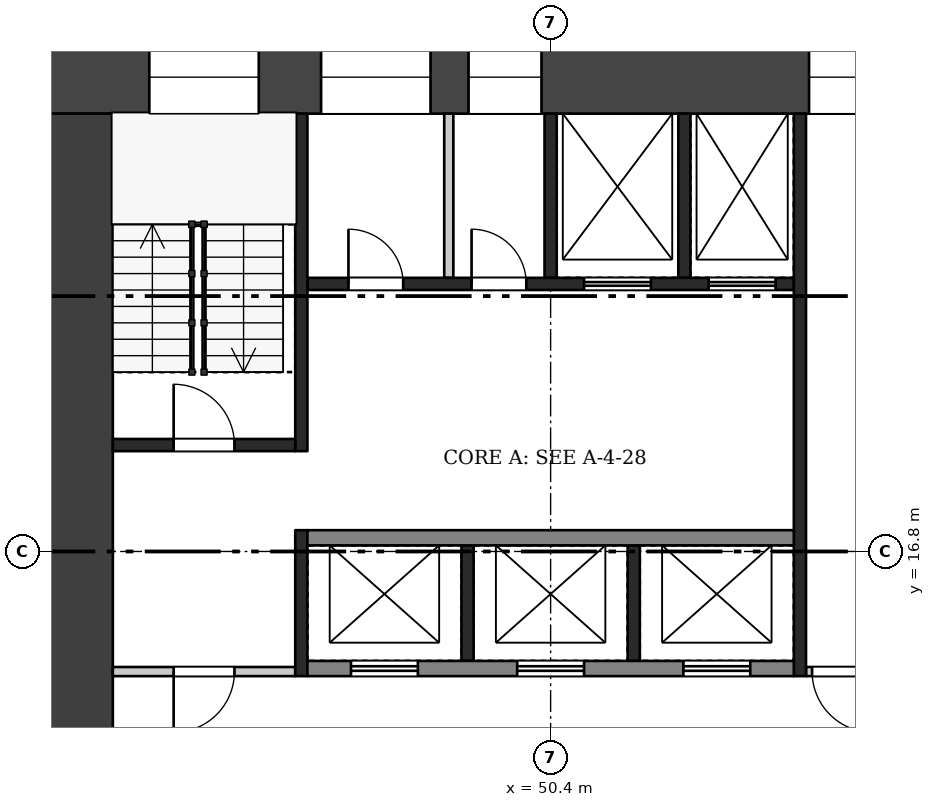
"""IFC4 building model, lengths in metres.
Left out: names, types, materials, properties, quantities, classifications, styles, units other than length and angle.
Written with IfcOpenShell. Run it as: python <this file> out.ifc"""

import sys

from ifc_helpers import new_model, si_unit, direction, frame, frame_2d, origin, place, context, subcontext, project, spatial, rectangle, extrude, element, fill, save


model = new_model("IFC4")
c1 = context("Model", 3, precision=1e-05, world=origin(), true_north=direction((0.0, 1.0)))
c2 = subcontext(c1, "Body", "Model", "MODEL_VIEW")
j1 = project(units=[si_unit("LENGTHUNIT", "METRE"), si_unit("PLANEANGLEUNIT", "RADIAN")], contexts=[c1])
p1 = place(None, origin())
s1 = spatial("IfcSite", under=j1, at=p1, CompositionType="ELEMENT")
p2 = place(p1, origin())
s2 = spatial("IfcBuilding", under=s1, at=p2, CompositionType="ELEMENT")
p3 = place(p2, frame((0.0, 0.0, 200.2)))
s3 = spatial("IfcBuildingStorey", under=s2, at=p3, CompositionType="ELEMENT", Elevation=200.2)
p4 = place(p3, frame((42.0, 24.6, 0.0), z_axis=(0.0, 0.0, 1.0), x_axis=(1.0, 0.0, 0.0)))
e1 = element("IfcWall", 1, at=p4, inside=s3, PredefinedType="SHEAR", context=c2, shape_type="SweptSolid", body=[
    extrude(rectangle(XDim=16.8, YDim=1.2, at=frame_2d((8.4, 0.0))), origin(), (0.0, 0.0, 1.0), 3.22),
])
p5 = place(p4, frame((1.8, 0.0, 0.5)))
e2 = element("IfcOpeningElement", 2, at=p5, cuts=e1, PredefinedType="OPENING", context=c2, shape_type="SweptSolid", body=[
    extrude(rectangle(XDim=1.8, YDim=2.4, at=frame_2d((0.9, 1.2))), frame((0.0, 0.61, 0.0), z_axis=(0.0, -1.0, 0.0), x_axis=(1.0, 0.0, 0.0)), (0.0, 0.0, 1.0), 1.22),
])
p6 = place(p4, frame((4.625, 0.0, 1.6)))
e3 = element("IfcOpeningElement", 3, at=p6, cuts=e1, PredefinedType="OPENING", context=c2, shape_type="SweptSolid", body=[
    extrude(rectangle(XDim=1.8, YDim=1.2, at=frame_2d((0.9, 0.6))), frame((0.0, 0.61, 0.0), z_axis=(0.0, -1.0, 0.0), x_axis=(1.0, 0.0, 0.0)), (0.0, 0.0, 1.0), 1.22),
])
p7 = place(p4, frame((7.05, 0.0, 1.6)))
e4 = element("IfcOpeningElement", 4, at=p7, cuts=e1, PredefinedType="OPENING", context=c2, shape_type="SweptSolid", body=[
    extrude(rectangle(XDim=1.2, YDim=1.2, at=frame_2d((0.6, 0.6))), frame((0.0, 0.61, 0.0), z_axis=(0.0, -1.0, 0.0), x_axis=(1.0, 0.0, 0.0)), (0.0, 0.0, 1.0), 1.22),
])
p8 = place(p4, frame((12.65, 0.0, 0.6)))
e5 = element("IfcOpeningElement", 5, at=p8, cuts=e1, PredefinedType="OPENING", context=c2, shape_type="SweptSolid", body=[
    extrude(rectangle(XDim=1.0, YDim=2.1, at=frame_2d((0.5, 1.05))), frame((0.0, 0.61, 0.0), z_axis=(0.0, -1.0, 0.0), x_axis=(1.0, 0.0, 0.0)), (0.0, 0.0, 1.0), 1.22),
])
p9 = place(p4, frame((14.175, 0.0, 1.6)))
e6 = element("IfcOpeningElement", 6, at=p9, cuts=e1, PredefinedType="OPENING", context=c2, shape_type="SweptSolid", body=[
    extrude(rectangle(XDim=1.2, YDim=1.2, at=frame_2d((0.6, 0.6))), frame((0.0, 0.61, 0.0), z_axis=(0.0, -1.0, 0.0), x_axis=(1.0, 0.0, 0.0)), (0.0, 0.0, 1.0), 1.22),
])
p10 = place(p3, frame((42.6, 9.6, 0.0), z_axis=(0.0, 0.0, 1.0), x_axis=(0.0, 1.0, 0.0)))
e7 = element("IfcWall", 7, at=p10, inside=s3, PredefinedType="SHEAR", context=c2, shape_type="SweptSolid", body=[
    extrude(rectangle(XDim=14.4, YDim=1.2, at=frame_2d((7.2, 0.0))), origin(), (0.0, 0.0, 1.0), 3.22),
])
p11 = place(p10, frame((2.1, 0.0, 0.0)))
e8 = element("IfcOpeningElement", 8, at=p11, cuts=e7, PredefinedType="OPENING", context=c2, shape_type="SweptSolid", body=[
    extrude(rectangle(XDim=1.8, YDim=2.1, at=frame_2d((0.9, 1.05))), frame((0.0, 0.61, 0.0), z_axis=(0.0, -1.0, 0.0), x_axis=(1.0, 0.0, 0.0)), (0.0, 0.0, 1.0), 1.22),
])
for number, where, z_axis, x_axis in (
    (9, (49.033, 15.0, 0.0), (0.0, 0.0, 1.0), (0.0, 1.0, 0.0)),
    (10, (51.767, 15.0, 0.0), (0.0, 0.0, 1.0), (0.0, 1.0, 0.0)),
):
    element("IfcWall", number, at=place(p3, frame(where, z_axis=z_axis, x_axis=x_axis)), inside=s3, PredefinedType="SHEAR", context=c2, shape_type="SweptSolid", body=[
        extrude(rectangle(XDim=1.9, YDim=0.2, at=frame_2d((0.95, 0.0))), origin(), (0.0, 0.0, 1.0), 3.22),
    ])
p12 = place(p3, frame((46.4, 14.875, 0.0), z_axis=(0.0, 0.0, 1.0), x_axis=(1.0, 0.0, 0.0)))
e11 = element("IfcWall", 11, at=p12, inside=s3, PredefinedType="SHEAR", context=c2, shape_type="SweptSolid", body=[
    extrude(rectangle(XDim=8.0, YDim=0.25, at=frame_2d((4.0, 0.0))), origin(), (0.0, 0.0, 1.0), 3.22),
])
p13 = place(p12, frame((0.717, 0.0, 0.0)))
e12 = element("IfcOpeningElement", 12, at=p13, cuts=e11, PredefinedType="OPENING", context=c2, shape_type="SweptSolid", body=[
    extrude(rectangle(XDim=1.1, YDim=2.1, at=frame_2d((0.55, 1.05))), frame((0.0, 0.135, 0.0), z_axis=(0.0, -1.0, 0.0), x_axis=(1.0, 0.0, 0.0)), (0.0, 0.0, 1.0), 0.27),
])
p14 = place(p12, frame((3.45, 0.0, 0.0)))
e13 = element("IfcOpeningElement", 13, at=p14, cuts=e11, PredefinedType="OPENING", context=c2, shape_type="SweptSolid", body=[
    extrude(rectangle(XDim=1.1, YDim=2.1, at=frame_2d((0.55, 1.05))), frame((0.0, 0.135, 0.0), z_axis=(0.0, -1.0, 0.0), x_axis=(1.0, 0.0, 0.0)), (0.0, 0.0, 1.0), 0.27),
])
p15 = place(p12, frame((6.183, 0.0, 0.0)))
e14 = element("IfcOpeningElement", 14, at=p15, cuts=e11, PredefinedType="OPENING", context=c2, shape_type="SweptSolid", body=[
    extrude(rectangle(XDim=1.1, YDim=2.1, at=frame_2d((0.55, 1.05))), frame((0.0, 0.135, 0.0), z_axis=(0.0, -1.0, 0.0), x_axis=(1.0, 0.0, 0.0)), (0.0, 0.0, 1.0), 0.27),
])
p16 = place(p3, frame((46.4, 17.025, 0.0), z_axis=(0.0, 0.0, 1.0), x_axis=(1.0, 0.0, 0.0)))
e15 = element("IfcWall", 15, at=p16, inside=s3, PredefinedType="SHEAR", context=c2, shape_type="SweptSolid", body=[
    extrude(rectangle(XDim=8.0, YDim=0.25, at=frame_2d((4.0, 0.0))), origin(), (0.0, 0.0, 1.0), 3.22),
])
for number, where, z_axis, x_axis in (
    (16, (50.4, 21.3, 0.0), (0.0, 0.0, 1.0), (0.0, 1.0, 0.0)),
    (17, (52.6, 21.3, 0.0), (0.0, 0.0, 1.0), (0.0, 1.0, 0.0)),
):
    element("IfcWall", number, at=place(p3, frame(where, z_axis=z_axis, x_axis=x_axis)), inside=s3, PredefinedType="SHEAR", context=c2, shape_type="SweptSolid", body=[
        extrude(rectangle(XDim=2.7, YDim=0.2, at=frame_2d((1.35, 0.0))), origin(), (0.0, 0.0, 1.0), 3.22),
    ])
p17 = place(p3, frame((48.725, 21.3, 0.0), z_axis=(0.0, 0.0, 1.0), x_axis=(0.0, 1.0, 0.0)))
e18 = element("IfcWall", 18, at=p17, inside=s3, PredefinedType="PARTITIONING", context=c2, shape_type="SweptSolid", body=[
    extrude(rectangle(XDim=2.7, YDim=0.15, at=frame_2d((1.35, 0.0))), origin(), (0.0, 0.0, 1.0), 3.22),
])
p18 = place(p3, frame((46.4, 21.2, 0.0), z_axis=(0.0, 0.0, 1.0), x_axis=(1.0, 0.0, 0.0)))
e19 = element("IfcWall", 19, at=p18, inside=s3, PredefinedType="SHEAR", context=c2, shape_type="SweptSolid", body=[
    extrude(rectangle(XDim=8.0, YDim=0.2, at=frame_2d((4.0, 0.0))), origin(), (0.0, 0.0, 1.0), 3.22),
])
p19 = place(p18, frame((0.675, 0.0, 0.0)))
e20 = element("IfcOpeningElement", 20, at=p19, cuts=e19, PredefinedType="OPENING", context=c2, shape_type="SweptSolid", body=[
    extrude(rectangle(XDim=0.9, YDim=2.1, at=frame_2d((0.45, 1.05))), frame((0.0, 0.11, 0.0), z_axis=(0.0, -1.0, 0.0), x_axis=(1.0, 0.0, 0.0)), (0.0, 0.0, 1.0), 0.22),
])
p20 = place(p18, frame((2.7, 0.0, 0.0)))
e21 = element("IfcOpeningElement", 21, at=p20, cuts=e19, PredefinedType="OPENING", context=c2, shape_type="SweptSolid", body=[
    extrude(rectangle(XDim=0.9, YDim=2.1, at=frame_2d((0.45, 1.05))), frame((0.0, 0.11, 0.0), z_axis=(0.0, -1.0, 0.0), x_axis=(1.0, 0.0, 0.0)), (0.0, 0.0, 1.0), 0.22),
])
p21 = place(p18, frame((4.55, 0.0, 0.0)))
e22 = element("IfcOpeningElement", 22, at=p21, cuts=e19, PredefinedType="OPENING", context=c2, shape_type="SweptSolid", body=[
    extrude(rectangle(XDim=1.1, YDim=2.1, at=frame_2d((0.55, 1.05))), frame((0.0, 0.11, 0.0), z_axis=(0.0, -1.0, 0.0), x_axis=(1.0, 0.0, 0.0)), (0.0, 0.0, 1.0), 0.22),
])
p22 = place(p18, frame((6.6, 0.0, 0.0)))
e23 = element("IfcOpeningElement", 23, at=p22, cuts=e19, PredefinedType="OPENING", context=c2, shape_type="SweptSolid", body=[
    extrude(rectangle(XDim=1.1, YDim=2.1, at=frame_2d((0.55, 1.05))), frame((0.0, 0.11, 0.0), z_axis=(0.0, -1.0, 0.0), x_axis=(1.0, 0.0, 0.0)), (0.0, 0.0, 1.0), 0.22),
])
p23 = place(p3, frame((46.3, 14.75, 0.0), z_axis=(0.0, 0.0, 1.0), x_axis=(0.0, 1.0, 0.0)))
e24 = element("IfcWall", 24, at=p23, inside=s3, PredefinedType="SHEAR", context=c2, shape_type="SweptSolid", body=[
    extrude(rectangle(XDim=2.4, YDim=0.2, at=frame_2d((1.2, 0.0))), origin(), (0.0, 0.0, 1.0), 3.22),
])
p24 = place(p3, frame((46.3, 18.45, 0.0), z_axis=(0.0, 0.0, 1.0), x_axis=(0.0, 1.0, 0.0)))
e25 = element("IfcWall", 25, at=p24, inside=s3, PredefinedType="SHEAR", context=c2, shape_type="SweptSolid", body=[
    extrude(rectangle(XDim=5.55, YDim=0.2, at=frame_2d((2.775, 0.0))), origin(), (0.0, 0.0, 1.0), 3.22),
])
p25 = place(p3, frame((43.2, 14.825, 0.0), z_axis=(0.0, 0.0, 1.0), x_axis=(1.0, 0.0, 0.0)))
e26 = element("IfcWall", 26, at=p25, inside=s3, PredefinedType="PARTITIONING", context=c2, shape_type="SweptSolid", body=[
    extrude(rectangle(XDim=3.0, YDim=0.15, at=frame_2d((1.5, 0.0))), origin(), (0.0, 0.0, 1.0), 3.22),
])
p26 = place(p25, frame((1.0, 0.0, 0.0)))
e27 = element("IfcOpeningElement", 27, at=p26, cuts=e26, PredefinedType="OPENING", context=c2, shape_type="SweptSolid", body=[
    extrude(rectangle(XDim=1.0, YDim=2.1, at=frame_2d((0.5, 1.05))), frame((0.0, 0.085, 0.0), z_axis=(0.0, -1.0, 0.0), x_axis=(1.0, 0.0, 0.0)), (0.0, 0.0, 1.0), 0.17),
])
p27 = place(p3, frame((43.2, 18.55, 0.0), z_axis=(0.0, 0.0, 1.0), x_axis=(1.0, 0.0, 0.0)))
e28 = element("IfcWall", 28, at=p27, inside=s3, PredefinedType="SHEAR", context=c2, shape_type="SweptSolid", body=[
    extrude(rectangle(XDim=3.0, YDim=0.2, at=frame_2d((1.5, 0.0))), origin(), (0.0, 0.0, 1.0), 3.22),
])
p28 = place(p27, frame((1.0, 0.0, 0.0)))
e29 = element("IfcOpeningElement", 29, at=p28, cuts=e28, PredefinedType="OPENING", context=c2, shape_type="SweptSolid", body=[
    extrude(rectangle(XDim=1.0, YDim=2.1, at=frame_2d((0.5, 1.05))), frame((0.0, 0.11, 0.0), z_axis=(0.0, -1.0, 0.0), x_axis=(1.0, 0.0, 0.0)), (0.0, 0.0, 1.0), 0.22),
])
p29 = place(p3, frame((54.5, 14.75, 0.0), z_axis=(0.0, 0.0, 1.0), x_axis=(0.0, 1.0, 0.0)))
e30 = element("IfcWall", 30, at=p29, inside=s3, PredefinedType="SHEAR", context=c2, shape_type="SweptSolid", body=[
    extrude(rectangle(XDim=9.25, YDim=0.2, at=frame_2d((4.625, 0.0))), origin(), (0.0, 0.0, 1.0), 3.22),
])
p30 = place(p3, frame((54.6, 14.825, 0.0), z_axis=(0.0, 0.0, 1.0), x_axis=(1.0, 0.0, 0.0)))
e31 = element("IfcWall", 31, at=p30, inside=s3, PredefinedType="PARTITIONING", context=c2, shape_type="SweptSolid", body=[
    extrude(rectangle(XDim=3.0, YDim=0.15, at=frame_2d((1.5, 0.0))), origin(), (0.0, 0.0, 1.0), 3.22),
])
p31 = place(p30, frame((0.1, 0.0, 0.0)))
e32 = element("IfcOpeningElement", 32, at=p31, cuts=e31, PredefinedType="OPENING", context=c2, shape_type="SweptSolid", body=[
    extrude(rectangle(XDim=1.0, YDim=2.1, at=frame_2d((0.5, 1.05))), frame((0.0, 0.085, 0.0), z_axis=(0.0, -1.0, 0.0), x_axis=(1.0, 0.0, 0.0)), (0.0, 0.0, 1.0), 0.17),
])
p32 = place(p13, origin())
e33 = element("IfcDoor", 33, at=p32, inside=s3, OperationType="DOUBLE_DOOR_SLIDING", PredefinedType="DOOR", context=c2, shape_type="SweptSolid", body=[
    extrude(rectangle(XDim=1.1, YDim=2.1, at=frame_2d((0.55, 1.05))), frame((0.0, 0.025, 0.0), z_axis=(0.0, -1.0, 0.0), x_axis=(1.0, 0.0, 0.0)), (0.0, 0.0, 1.0), 0.05),
])
fill(e12, e33)
p33 = place(p14, origin())
e34 = element("IfcDoor", 34, at=p33, inside=s3, OperationType="DOUBLE_DOOR_SLIDING", PredefinedType="DOOR", context=c2, shape_type="SweptSolid", body=[
    extrude(rectangle(XDim=1.1, YDim=2.1, at=frame_2d((0.55, 1.05))), frame((0.0, 0.025, 0.0), z_axis=(0.0, -1.0, 0.0), x_axis=(1.0, 0.0, 0.0)), (0.0, 0.0, 1.0), 0.05),
])
fill(e13, e34)
p34 = place(p15, origin())
e35 = element("IfcDoor", 35, at=p34, inside=s3, OperationType="DOUBLE_DOOR_SLIDING", PredefinedType="DOOR", context=c2, shape_type="SweptSolid", body=[
    extrude(rectangle(XDim=1.1, YDim=2.1, at=frame_2d((0.55, 1.05))), frame((0.0, 0.025, 0.0), z_axis=(0.0, -1.0, 0.0), x_axis=(1.0, 0.0, 0.0)), (0.0, 0.0, 1.0), 0.05),
])
fill(e14, e35)
p35 = place(p19, origin())
e36 = element("IfcDoor", 36, at=p35, inside=s3, OperationType="SINGLE_SWING_LEFT", PredefinedType="DOOR", context=c2, shape_type="SweptSolid", body=[
    extrude(rectangle(XDim=0.9, YDim=2.1, at=frame_2d((0.45, 1.05))), frame((0.0, 0.025, 0.0), z_axis=(0.0, -1.0, 0.0), x_axis=(1.0, 0.0, 0.0)), (0.0, 0.0, 1.0), 0.05),
])
fill(e20, e36)
p36 = place(p20, origin())
e37 = element("IfcDoor", 37, at=p36, inside=s3, OperationType="SINGLE_SWING_LEFT", PredefinedType="DOOR", context=c2, shape_type="SweptSolid", body=[
    extrude(rectangle(XDim=0.9, YDim=2.1, at=frame_2d((0.45, 1.05))), frame((0.0, 0.025, 0.0), z_axis=(0.0, -1.0, 0.0), x_axis=(1.0, 0.0, 0.0)), (0.0, 0.0, 1.0), 0.05),
])
fill(e21, e37)
p37 = place(p21, origin())
e38 = element("IfcDoor", 38, at=p37, inside=s3, OperationType="DOUBLE_DOOR_SLIDING", PredefinedType="DOOR", context=c2, shape_type="SweptSolid", body=[
    extrude(rectangle(XDim=1.1, YDim=2.1, at=frame_2d((0.55, 1.05))), frame((0.0, 0.025, 0.0), z_axis=(0.0, -1.0, 0.0), x_axis=(1.0, 0.0, 0.0)), (0.0, 0.0, 1.0), 0.05),
])
fill(e22, e38)
p38 = place(p22, origin())
e39 = element("IfcDoor", 39, at=p38, inside=s3, OperationType="DOUBLE_DOOR_SLIDING", PredefinedType="DOOR", context=c2, shape_type="SweptSolid", body=[
    extrude(rectangle(XDim=1.1, YDim=2.1, at=frame_2d((0.55, 1.05))), frame((0.0, 0.025, 0.0), z_axis=(0.0, -1.0, 0.0), x_axis=(1.0, 0.0, 0.0)), (0.0, 0.0, 1.0), 0.05),
])
fill(e23, e39)
p39 = place(p26, frame((1.0, 0.0, 0.0), z_axis=(0.0, 0.0, 1.0), x_axis=(-1.0, 0.0, 0.0)))
e40 = element("IfcDoor", 40, at=p39, inside=s3, OperationType="SINGLE_SWING_RIGHT", PredefinedType="DOOR", context=c2, shape_type="SweptSolid", body=[
    extrude(rectangle(XDim=1.0, YDim=2.1, at=frame_2d((0.5, 1.05))), frame((0.0, 0.025, 0.0), z_axis=(0.0, -1.0, 0.0), x_axis=(1.0, 0.0, 0.0)), (0.0, 0.0, 1.0), 0.05),
])
fill(e27, e40)
p40 = place(p28, origin())
e41 = element("IfcDoor", 41, at=p40, inside=s3, OperationType="SINGLE_SWING_LEFT", PredefinedType="DOOR", context=c2, shape_type="SweptSolid", body=[
    extrude(rectangle(XDim=1.0, YDim=2.1, at=frame_2d((0.5, 1.05))), frame((0.0, 0.025, 0.0), z_axis=(0.0, -1.0, 0.0), x_axis=(1.0, 0.0, 0.0)), (0.0, 0.0, 1.0), 0.05),
])
fill(e29, e41)
p41 = place(p31, frame((1.0, 0.0, 0.0), z_axis=(0.0, 0.0, 1.0), x_axis=(-1.0, 0.0, 0.0)))
e42 = element("IfcDoor", 42, at=p41, inside=s3, OperationType="SINGLE_SWING_LEFT", PredefinedType="DOOR", context=c2, shape_type="SweptSolid", body=[
    extrude(rectangle(XDim=1.0, YDim=2.1, at=frame_2d((0.5, 1.05))), frame((0.0, 0.025, 0.0), z_axis=(0.0, -1.0, 0.0), x_axis=(1.0, 0.0, 0.0)), (0.0, 0.0, 1.0), 0.05),
])
fill(e32, e42)
p42 = place(p5, origin())
e43 = element("IfcWindow", 43, at=p42, inside=s3, PartitioningType="SINGLE_PANEL", PredefinedType="WINDOW", context=c2, shape_type="SweptSolid", body=[
    extrude(rectangle(XDim=1.8, YDim=2.4, at=frame_2d((0.9, 1.2))), frame((0.0, 0.03, 0.0), z_axis=(0.0, -1.0, 0.0), x_axis=(1.0, 0.0, 0.0)), (0.0, 0.0, 1.0), 0.06),
])
fill(e2, e43)
p43 = place(p6, origin())
e44 = element("IfcWindow", 44, at=p43, inside=s3, PartitioningType="SINGLE_PANEL", PredefinedType="WINDOW", context=c2, shape_type="SweptSolid", body=[
    extrude(rectangle(XDim=1.8, YDim=1.2, at=frame_2d((0.9, 0.6))), frame((0.0, 0.03, 0.0), z_axis=(0.0, -1.0, 0.0), x_axis=(1.0, 0.0, 0.0)), (0.0, 0.0, 1.0), 0.06),
])
fill(e3, e44)
p44 = place(p7, origin())
e45 = element("IfcWindow", 45, at=p44, inside=s3, PartitioningType="SINGLE_PANEL", PredefinedType="WINDOW", context=c2, shape_type="SweptSolid", body=[
    extrude(rectangle(XDim=1.2, YDim=1.2, at=frame_2d((0.6, 0.6))), frame((0.0, 0.03, 0.0), z_axis=(0.0, -1.0, 0.0), x_axis=(1.0, 0.0, 0.0)), (0.0, 0.0, 1.0), 0.06),
])
fill(e4, e45)
p45 = place(p8, origin())
e46 = element("IfcWindow", 46, at=p45, inside=s3, PartitioningType="SINGLE_PANEL", PredefinedType="WINDOW", context=c2, shape_type="SweptSolid", body=[
    extrude(rectangle(XDim=1.0, YDim=2.1, at=frame_2d((0.5, 1.05))), frame((0.0, 0.03, 0.0), z_axis=(0.0, -1.0, 0.0), x_axis=(1.0, 0.0, 0.0)), (0.0, 0.0, 1.0), 0.06),
])
fill(e5, e46)
save(model, sys.argv[1])
